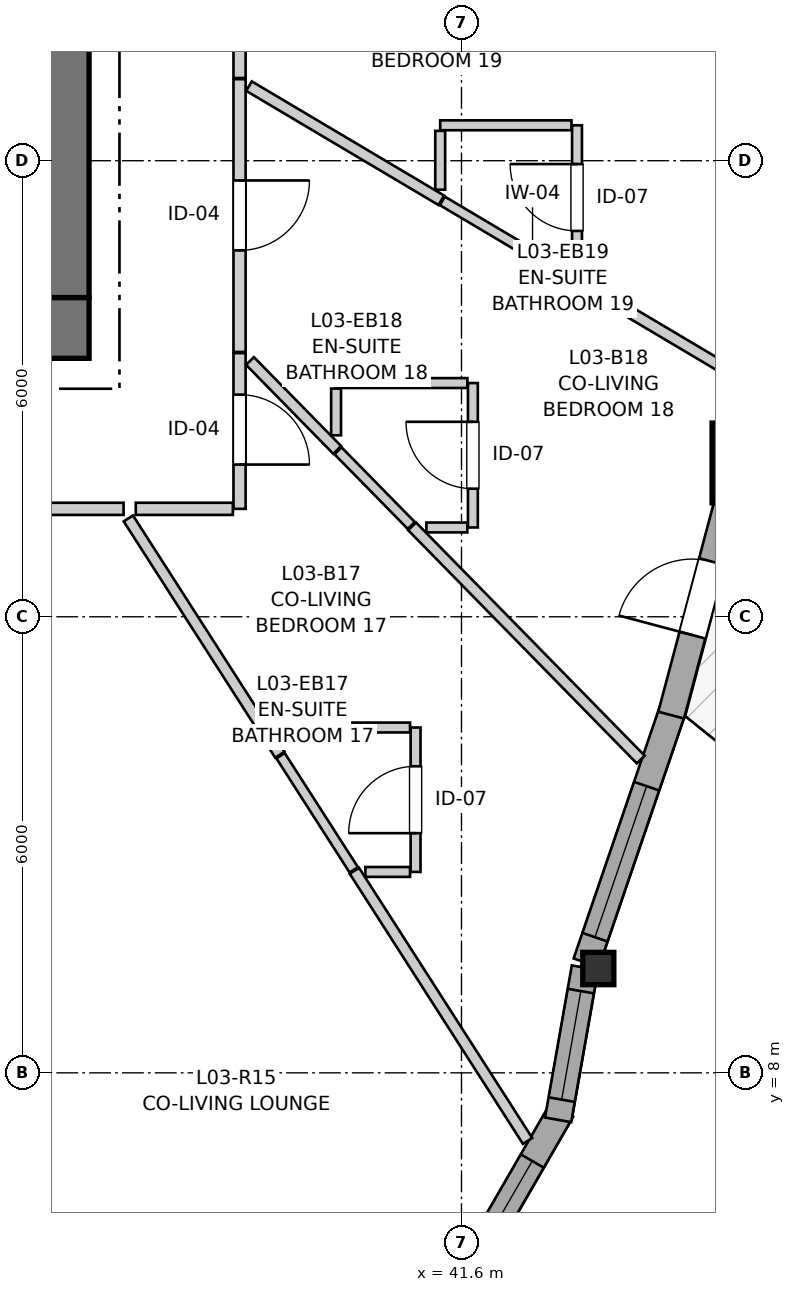
"""IFC4 building model, lengths in metres.
Left out: names, types, materials, properties, quantities, classifications, styles, units other than length and angle.
Written with IfcOpenShell. Run it as: python <this file> out.ifc"""

import sys

from ifc_helpers import new_model, si_unit, direction, frame, frame_2d, origin, origin_2d, place, context, subcontext, project, spatial, rectangle, i_section, extrude, source, transform, mapped, element, fill, save


model = new_model("IFC4")
c1 = context("Model", 3, precision=1e-05, world=origin(), true_north=direction((0.0, 1.0)))
c2 = subcontext(c1, "Body", "Model", "MODEL_VIEW")
j1 = project(units=[si_unit("LENGTHUNIT", "METRE"), si_unit("PLANEANGLEUNIT", "RADIAN")], contexts=[c1])
p1 = place(None, origin())
s1 = spatial("IfcSite", under=j1, at=p1, CompositionType="ELEMENT")
p2 = place(p1, origin())
s2 = spatial("IfcBuilding", under=s1, at=p2, CompositionType="ELEMENT")
p3 = place(p2, frame((0.0, 0.0, 14.2)))
s3 = spatial("IfcBuildingStorey", under=s2, at=p3, CompositionType="ELEMENT", Elevation=14.2)
p4 = place(p3, frame((24.0, 17.8, 0.0), z_axis=(0.0, 0.0, 1.0), x_axis=(1.0, 0.0, 0.0)))
e1 = element("IfcWall", 1, at=p4, inside=s3, PredefinedType="SHEAR", context=c2, shape_type="SweptSolid", body=[
    extrude(rectangle(XDim=12.7, YDim=0.8, at=frame_2d((6.35, 0.0))), origin(), (0.0, 0.0, 1.0), 2.94),
])
p5 = place(p3, frame((36.3, 18.2, 0.0), z_axis=(0.0, 0.0, 1.0), x_axis=(0.0, 1.0, 0.0)))
e2 = element("IfcWall", 2, at=p5, inside=s3, PredefinedType="SHEAR", context=c2, shape_type="SweptSolid", body=[
    extrude(rectangle(XDim=15.6, YDim=0.8, at=frame_2d((7.8, 0.0))), origin(), (0.0, 0.0, 1.0), 2.94),
])
p6 = place(p5, frame((4.25, 0.0, 0.0)))
e3 = element("IfcOpeningElement", 3, at=p6, cuts=e2, PredefinedType="OPENING", context=c2, shape_type="SweptSolid", body=[
    extrude(rectangle(XDim=1.1, YDim=2.15, at=frame_2d((0.55, 1.075))), frame((0.0, 0.41, 0.0), z_axis=(0.0, -1.0, 0.0), x_axis=(1.0, 0.0, 0.0)), (0.0, 0.0, 1.0), 0.82),
])
p7 = place(p5, frame((10.25, 0.0, 0.0)))
e4 = element("IfcOpeningElement", 4, at=p7, cuts=e2, PredefinedType="OPENING", context=c2, shape_type="SweptSolid", body=[
    extrude(rectangle(XDim=1.1, YDim=2.15, at=frame_2d((0.55, 1.075))), frame((0.0, 0.41, 0.0), z_axis=(0.0, -1.0, 0.0), x_axis=(1.0, 0.0, 0.0)), (0.0, 0.0, 1.0), 0.82),
])
m1 = source(origin(), c2, "Body", "SweptSolid", [
    extrude(i_section(OverallWidth=0.409, OverallDepth=0.425, WebThickness=0.03, FlangeThickness=0.048, FilletRadius=0.015, at=origin_2d()), origin(), (0.0, 0.0, 1.0), 2.94),
])
p8 = place(p3, frame((43.4, 9.372, 0.0), z_axis=(0.0, 0.0, 1.0), x_axis=(1.0, 0.0, 0.0)))
e5 = element("IfcColumn", 5, at=p8, inside=s3, PredefinedType="PILASTER", context=c2, shape_type="MappedRepresentation", body=[
    mapped(m1, transform((0.0, 0.0, 0.0), x_axis=(1.0, 0.0, 0.0), y_axis=(0.0, 1.0, 0.0), z_axis=(0.0, 0.0, 1.0), scale=1.0)),
])
m2 = source(origin(), c2, "Body", "SweptSolid", [
    extrude(rectangle(XDim=1.05, YDim=1.05, at=origin_2d()), origin(), (0.0, 0.0, 1.0), 2.94),
])
p9 = place(p3, frame((45.422, 16.023, 0.0), z_axis=(0.0, 0.0, 1.0), x_axis=(1.0, 0.0, 0.0)))
e6 = element("IfcColumn", 6, at=p9, inside=s3, PredefinedType="COLUMN", context=c2, shape_type="MappedRepresentation", body=[
    mapped(m2, transform((0.0, 0.0, 0.0), x_axis=(1.0, 0.0, 0.0), y_axis=(0.0, 1.0, 0.0), z_axis=(0.0, 0.0, 1.0), scale=1.0)),
])
p10 = place(p3, frame((41.873, 5.699, 0.0), z_axis=(0.0, 0.0, 1.0), x_axis=(0.49990781971, 0.866078617559, 0.0)))
e7 = element("IfcWall", 7, at=p10, inside=s3, PredefinedType="SOLIDWALL", context=c2, shape_type="SweptSolid", body=[
    extrude(rectangle(XDim=2.09, YDim=0.35, at=frame_2d((1.045, 0.0))), origin(), (0.0, 0.0, 1.0), 2.42),
])
p11 = place(p10, frame((0.268, 0.0, 0.82)))
e8 = element("IfcOpeningElement", 8, at=p11, cuts=e7, PredefinedType="OPENING", context=c2, shape_type="SweptSolid", body=[
    extrude(rectangle(XDim=1.05, YDim=1.45, at=frame_2d((0.525, 0.725))), frame((0.0, 0.185, 0.0), z_axis=(0.0, -1.0, 0.0), x_axis=(1.0, 0.0, 0.0)), (0.0, 0.0, 1.0), 0.37),
])
p12 = place(p3, frame((42.871, 7.382, 0.0), z_axis=(0.0, 0.0, 1.0), x_axis=(0.173586593252, 0.984818610021, 0.0)))
e9 = element("IfcWall", 9, at=p12, inside=s3, PredefinedType="SOLIDWALL", context=c2, shape_type="SweptSolid", body=[
    extrude(rectangle(XDim=2.032, YDim=0.35, at=frame_2d((1.016, 0.0))), origin(), (0.0, 0.0, 1.0), 2.42),
])
p13 = place(p12, frame((0.27, 0.0, 0.82)))
e10 = element("IfcOpeningElement", 10, at=p13, cuts=e9, PredefinedType="OPENING", context=c2, shape_type="SweptSolid", body=[
    extrude(rectangle(XDim=1.45, YDim=1.25, at=frame_2d((0.725, 0.625))), frame((0.0, 0.185, 0.0), z_axis=(0.0, -1.0, 0.0), x_axis=(1.0, 0.0, 0.0)), (0.0, 0.0, 1.0), 0.37),
])
p14 = place(p3, frame((43.241, 9.448, 0.0), z_axis=(0.0, 0.0, 1.0), x_axis=(0.323599751171, 0.946194060984, 0.0)))
e11 = element("IfcWall", 11, at=p14, inside=s3, PredefinedType="SOLIDWALL", context=c2, shape_type="SweptSolid", body=[
    extrude(rectangle(XDim=3.532, YDim=0.35, at=frame_2d((1.766, 0.0))), origin(), (0.0, 0.0, 1.0), 2.42),
])
p15 = place(p14, frame((0.356, 0.0, 0.82)))
e12 = element("IfcOpeningElement", 12, at=p15, cuts=e11, PredefinedType="OPENING", context=c2, shape_type="SweptSolid", body=[
    extrude(rectangle(XDim=2.1, YDim=1.4, at=frame_2d((1.05, 0.7))), frame((0.0, 0.185, 0.0), z_axis=(0.0, -1.0, 0.0), x_axis=(1.0, 0.0, 0.0)), (0.0, 0.0, 1.0), 0.37),
])
p16 = place(p3, frame((44.358, 12.706, 0.0), z_axis=(0.0, 0.0, 1.0), x_axis=(0.25708907847, 0.966387709841, 0.0)))
e13 = element("IfcWall", 13, at=p16, inside=s3, PredefinedType="SOLIDWALL", context=c2, shape_type="SweptSolid", body=[
    extrude(rectangle(XDim=3.179, YDim=0.35, at=frame_2d((1.59, 0.0))), origin(), (0.0, 0.0, 1.0), 2.42),
])
p17 = place(p16, frame((1.09, 0.0, 0.0)))
e14 = element("IfcOpeningElement", 14, at=p17, cuts=e13, PredefinedType="OPENING", context=c2, shape_type="SweptSolid", body=[
    extrude(rectangle(XDim=1.0, YDim=2.1, at=frame_2d((0.5, 1.05))), frame((0.0, 0.185, 0.0), z_axis=(0.0, -1.0, 0.0), x_axis=(1.0, 0.0, 0.0)), (0.0, 0.0, 1.0), 0.37),
])
p18 = place(p3, frame((37.154, 15.42, 0.0), z_axis=(0.0, 0.0, 1.0), x_axis=(-1.0, 0.0, 0.0)))
e15 = element("IfcWall", 15, at=p18, inside=s3, PredefinedType="PARTITIONING", context=c2, shape_type="SweptSolid", body=[
    extrude(rectangle(XDim=3.774, YDim=0.16, at=frame_2d((1.887, 0.0))), origin(), (0.0, 0.0, 1.0), 2.94),
])
p19 = place(p18, frame((1.239, 0.0, 0.0)))
e16 = element("IfcOpeningElement", 16, at=p19, cuts=e15, PredefinedType="OPENING", context=c2, shape_type="SweptSolid", body=[
    extrude(rectangle(XDim=1.3, YDim=2.1, at=frame_2d((0.65, 1.05))), frame((0.0, 0.09, 0.0), z_axis=(0.0, -1.0, 0.0), x_axis=(1.0, 0.0, 0.0)), (0.0, 0.0, 1.0), 0.18),
])
p20 = place(p3, frame((38.68, 21.073, 0.0), z_axis=(0.0, 0.0, 1.0), x_axis=(0.0, -1.0, 0.0)))
e17 = element("IfcWall", 17, at=p20, inside=s3, PredefinedType="PARTITIONING", context=c2, shape_type="SweptSolid", body=[
    extrude(rectangle(XDim=3.589, YDim=0.16, at=frame_2d((1.794, 0.0))), origin(), (0.0, 0.0, 1.0), 2.94),
])
p21 = place(p20, frame((1.333, 0.0, 0.0)))
e18 = element("IfcOpeningElement", 18, at=p21, cuts=e17, PredefinedType="OPENING", context=c2, shape_type="SweptSolid", body=[
    extrude(rectangle(XDim=0.92, YDim=2.1, at=frame_2d((0.46, 1.05))), frame((0.0, 0.09, 0.0), z_axis=(0.0, -1.0, 0.0), x_axis=(1.0, 0.0, 0.0)), (0.0, 0.0, 1.0), 0.18),
])
p22 = place(p3, frame((38.68, 23.63, 0.0), z_axis=(0.0, 0.0, 1.0), x_axis=(0.0, -1.0, 0.0)))
e19 = element("IfcWall", 19, at=p22, inside=s3, PredefinedType="PARTITIONING", context=c2, shape_type="SweptSolid", body=[
    extrude(rectangle(XDim=2.542, YDim=0.16, at=frame_2d((1.271, 0.0))), origin(), (0.0, 0.0, 1.0), 2.94),
])
p23 = place(p22, frame((0.835, 0.0, 0.0)))
e20 = element("IfcOpeningElement", 20, at=p23, cuts=e19, PredefinedType="OPENING", context=c2, shape_type="SweptSolid", body=[
    extrude(rectangle(XDim=0.92, YDim=2.1, at=frame_2d((0.46, 1.05))), frame((0.0, 0.09, 0.0), z_axis=(0.0, -1.0, 0.0), x_axis=(1.0, 0.0, 0.0)), (0.0, 0.0, 1.0), 0.18),
])
p24 = place(p3, frame((38.68, 17.469, 0.0), z_axis=(0.0, 0.0, 1.0), x_axis=(0.0, -1.0, 0.0)))
e21 = element("IfcWall", 21, at=p24, inside=s3, PredefinedType="PARTITIONING", context=c2, shape_type="SweptSolid", body=[
    extrude(rectangle(XDim=2.049, YDim=0.16, at=frame_2d((1.024, 0.0))), origin(), (0.0, 0.0, 1.0), 2.94),
])
p25 = place(p24, frame((0.546, 0.0, 0.0)))
e22 = element("IfcOpeningElement", 22, at=p25, cuts=e21, PredefinedType="OPENING", context=c2, shape_type="SweptSolid", body=[
    extrude(rectangle(XDim=0.92, YDim=2.1, at=frame_2d((0.46, 1.05))), frame((0.0, 0.09, 0.0), z_axis=(0.0, -1.0, 0.0), x_axis=(1.0, 0.0, 0.0)), (0.0, 0.0, 1.0), 0.18),
])
p26 = place(p3, frame((43.12, 18.566, 0.0), z_axis=(0.0, 0.0, 1.0), x_axis=(0.0, 1.0, 0.0)))
e23 = element("IfcWall", 23, at=p26, inside=s3, PredefinedType="PARTITIONING", context=c2, shape_type="SweptSolid", body=[
    extrude(rectangle(XDim=1.9, YDim=0.13, at=frame_2d((0.95, 0.0))), origin(), (0.0, 0.0, 1.0), 2.94),
])
p27 = place(p26, frame((0.51, 0.0, 0.0)))
e24 = element("IfcOpeningElement", 24, at=p27, cuts=e23, PredefinedType="OPENING", context=c2, shape_type="SweptSolid", body=[
    extrude(rectangle(XDim=0.88, YDim=2.05, at=frame_2d((0.44, 1.025))), frame((0.0, 0.075, 0.0), z_axis=(0.0, -1.0, 0.0), x_axis=(1.0, 0.0, 0.0)), (0.0, 0.0, 1.0), 0.15),
])
p28 = place(p3, frame((40.996, 10.643, 0.0), z_axis=(0.0, 0.0, 1.0), x_axis=(0.0, 1.0, 0.0)))
e25 = element("IfcWall", 25, at=p28, inside=s3, PredefinedType="PARTITIONING", context=c2, shape_type="SweptSolid", body=[
    extrude(rectangle(XDim=1.9, YDim=0.13, at=frame_2d((0.95, 0.0))), origin(), (0.0, 0.0, 1.0), 2.94),
])
p29 = place(p28, frame((0.51, 0.0, 0.0)))
e26 = element("IfcOpeningElement", 26, at=p29, cuts=e25, PredefinedType="OPENING", context=c2, shape_type="SweptSolid", body=[
    extrude(rectangle(XDim=0.88, YDim=2.05, at=frame_2d((0.44, 1.025))), frame((0.0, 0.075, 0.0), z_axis=(0.0, -1.0, 0.0), x_axis=(1.0, 0.0, 0.0)), (0.0, 0.0, 1.0), 0.15),
])
p30 = place(p3, frame((41.75, 15.175, 0.0), z_axis=(0.0, 0.0, 1.0), x_axis=(0.0, 1.0, 0.0)))
e27 = element("IfcWall", 27, at=p30, inside=s3, PredefinedType="PARTITIONING", context=c2, shape_type="SweptSolid", body=[
    extrude(rectangle(XDim=1.9, YDim=0.13, at=frame_2d((0.95, 0.0))), origin(), (0.0, 0.0, 1.0), 2.94),
])
p31 = place(p30, frame((0.51, 0.0, 0.0)))
e28 = element("IfcOpeningElement", 28, at=p31, cuts=e27, PredefinedType="OPENING", context=c2, shape_type="SweptSolid", body=[
    extrude(rectangle(XDim=0.88, YDim=2.05, at=frame_2d((0.44, 1.025))), frame((0.0, 0.075, 0.0), z_axis=(0.0, -1.0, 0.0), x_axis=(1.0, 0.0, 0.0)), (0.0, 0.0, 1.0), 0.15),
])
p32 = place(p3, frame((33.426, 15.312, 0.0), z_axis=(0.0, 0.0, 1.0), x_axis=(0.276606114731, -0.960983380342, 0.0)))
e29 = element("IfcWall", 29, at=p32, inside=s3, PredefinedType="PARTITIONING", context=c2, shape_type="SweptSolid", body=[
    extrude(rectangle(XDim=11.749, YDim=0.145, at=frame_2d((5.875, 0.0))), origin(), (0.0, 0.0, 1.0), 2.94),
])
p33 = place(p3, frame((40.95, 15.19, 0.0), z_axis=(0.0, 0.0, 1.0), x_axis=(0.700142401903, -0.714003233226, 0.0)))
e30 = element("IfcWall", 30, at=p33, inside=s3, PredefinedType="PARTITIONING", context=c2, shape_type="SweptSolid", body=[
    extrude(rectangle(XDim=4.298, YDim=0.145, at=frame_2d((2.149, 0.0))), origin(), (0.0, 0.0, 1.0), 2.94),
])
p34 = place(p3, frame((40.191, 10.658, 0.0), z_axis=(0.0, 0.0, 1.0), x_axis=(0.539757550566, -0.841820519236, 0.0)))
e31 = element("IfcWall", 31, at=p34, inside=s3, PredefinedType="PARTITIONING", context=c2, shape_type="SweptSolid", body=[
    extrude(rectangle(XDim=4.221, YDim=0.145, at=frame_2d((2.111, 0.0))), origin(), (0.0, 0.0, 1.0), 2.94),
])
p35 = place(p3, frame((37.217, 15.294, 0.0), z_axis=(0.0, 0.0, 1.0), x_axis=(0.539878709929, -0.841742822105, 0.0)))
e32 = element("IfcWall", 32, at=p35, inside=s3, PredefinedType="PARTITIONING", context=c2, shape_type="SweptSolid", body=[
    extrude(rectangle(XDim=3.694, YDim=0.145, at=frame_2d((1.847, 0.0))), origin(), (0.0, 0.0, 1.0), 2.94),
])
p36 = place(p3, frame((38.804, 20.981, 0.0), z_axis=(0.0, 0.0, 1.0), x_axis=(0.859905944731, -0.510452511225, 0.0)))
e33 = element("IfcWall", 33, at=p36, inside=s3, PredefinedType="PARTITIONING", context=c2, shape_type="SweptSolid", body=[
    extrude(rectangle(XDim=2.943, YDim=0.145, at=frame_2d((1.472, 0.0))), origin(), (0.0, 0.0, 1.0), 2.94),
])
p37 = place(p3, frame((42.848, 18.581, 0.0), z_axis=(0.0, 0.0, 1.0), x_axis=(0.859872599939, -0.510508679528, 0.0)))
e34 = element("IfcWall", 34, at=p37, inside=s3, PredefinedType="PARTITIONING", context=c2, shape_type="SweptSolid", body=[
    extrude(rectangle(XDim=2.813, YDim=0.145, at=frame_2d((1.407, 0.0))), origin(), (0.0, 0.0, 1.0), 2.94),
])
p38 = place(p3, frame((38.817, 17.365, 0.0), z_axis=(0.0, 0.0, 1.0), x_axis=(0.70029627305, -0.713852316626, 0.0)))
e35 = element("IfcWall", 35, at=p38, inside=s3, PredefinedType="PARTITIONING", context=c2, shape_type="SweptSolid", body=[
    extrude(rectangle(XDim=1.639, YDim=0.145, at=frame_2d((0.819, 0.0))), origin(), (0.0, 0.0, 1.0), 2.94),
])
for number, where, z_axis, x_axis in (
    (36, (39.196, 12.543, 0.0), (0.0, 0.0, 1.0), (1.0, 0.0, 0.0)),
    (37, (39.95, 17.075, 0.0), (0.0, 0.0, 1.0), (1.0, 0.0, 0.0)),
    (38, (41.32, 20.466, 0.0), (0.0, 0.0, 1.0), (1.0, 0.0, 0.0)),
):
    element("IfcWall", number, at=place(p3, frame(where, z_axis=z_axis, x_axis=x_axis)), inside=s3, PredefinedType="PARTITIONING", context=c2, shape_type="SweptSolid", body=[
        extrude(rectangle(XDim=1.727, YDim=0.13, at=frame_2d((0.864, 0.0))), origin(), (0.0, 0.0, 1.0), 2.94),
    ])
p39 = place(p3, frame((39.219, 12.172, 0.0), z_axis=(0.0, 0.0, 1.0), x_axis=(0.539899826285, -0.84172927808, 0.0)))
e39 = element("IfcWall", 39, at=p39, inside=s3, PredefinedType="PARTITIONING", context=c2, shape_type="SweptSolid", body=[
    extrude(rectangle(XDim=1.784, YDim=0.13, at=frame_2d((0.892, 0.0))), origin(), (0.0, 0.0, 1.0), 2.94),
])
p40 = place(p3, frame((41.348, 19.471, 0.0), z_axis=(0.0, 0.0, 1.0), x_axis=(0.859825694404, -0.510587676352, 0.0)))
e40 = element("IfcWall", 40, at=p40, inside=s3, PredefinedType="PARTITIONING", context=c2, shape_type="SweptSolid", body=[
    extrude(rectangle(XDim=1.729, YDim=0.13, at=frame_2d((0.865, 0.0))), origin(), (0.0, 0.0, 1.0), 2.94),
])
p41 = place(p3, frame((37.314, 15.42, 0.0), z_axis=(0.0, 0.0, 1.0), x_axis=(1.0, 0.0, 0.0)))
e41 = element("IfcWall", 41, at=p41, inside=s3, PredefinedType="PARTITIONING", context=c2, shape_type="SweptSolid", body=[
    extrude(rectangle(XDim=1.278, YDim=0.16, at=frame_2d((0.639, 0.0))), origin(), (0.0, 0.0, 1.0), 2.94),
])
p42 = place(p3, frame((39.975, 16.184, 0.0), z_axis=(0.0, 0.0, 1.0), x_axis=(0.700338966049, -0.713810431861, 0.0)))
e42 = element("IfcWall", 42, at=p42, inside=s3, PredefinedType="PARTITIONING", context=c2, shape_type="SweptSolid", body=[
    extrude(rectangle(XDim=1.377, YDim=0.13, at=frame_2d((0.689, 0.0))), origin(), (0.0, 0.0, 1.0), 2.94),
])
p43 = place(p3, frame((41.32, 19.619, 0.0), z_axis=(0.0, 0.0, 1.0), x_axis=(0.0, 1.0, 0.0)))
e43 = element("IfcWall", 43, at=p43, inside=s3, PredefinedType="PARTITIONING", context=c2, shape_type="SweptSolid", body=[
    extrude(rectangle(XDim=0.774, YDim=0.13, at=frame_2d((0.387, 0.0))), origin(), (0.0, 0.0, 1.0), 2.94),
])
p44 = place(p3, frame((39.95, 16.388, 0.0), z_axis=(0.0, 0.0, 1.0), x_axis=(0.0, 1.0, 0.0)))
e44 = element("IfcWall", 44, at=p44, inside=s3, PredefinedType="PARTITIONING", context=c2, shape_type="SweptSolid", body=[
    extrude(rectangle(XDim=0.614, YDim=0.13, at=frame_2d((0.307, 0.0))), origin(), (0.0, 0.0, 1.0), 2.94),
])
p45 = place(p3, frame((40.336, 10.643, 0.0), z_axis=(0.0, 0.0, 1.0), x_axis=(1.0, 0.0, 0.0)))
e45 = element("IfcWall", 45, at=p45, inside=s3, PredefinedType="PARTITIONING", context=c2, shape_type="SweptSolid", body=[
    extrude(rectangle(XDim=0.587, YDim=0.13, at=frame_2d((0.294, 0.0))), origin(), (0.0, 0.0, 1.0), 2.94),
])
p46 = place(p3, frame((41.138, 15.175, 0.0), z_axis=(0.0, 0.0, 1.0), x_axis=(1.0, 0.0, 0.0)))
e46 = element("IfcWall", 46, at=p46, inside=s3, PredefinedType="PARTITIONING", context=c2, shape_type="SweptSolid", body=[
    extrude(rectangle(XDim=0.539, YDim=0.13, at=frame_2d((0.27, 0.0))), origin(), (0.0, 0.0, 1.0), 2.94),
])
m3 = source(origin(), c2, "Body", "SweptSolid", [
    extrude(rectangle(XDim=1.05, YDim=1.45, at=frame_2d((0.525, 0.725))), frame((0.0, 0.03, 0.0), z_axis=(0.0, -1.0, 0.0), x_axis=(1.0, 0.0, 0.0)), (0.0, 0.0, 1.0), 0.06),
])
p47 = place(p11, origin())
e47 = element("IfcWindow", 47, at=p47, inside=s3, PartitioningType="SINGLE_PANEL", PredefinedType="WINDOW", context=c2, shape_type="MappedRepresentation", body=[
    mapped(m3, transform((0.0, 0.0, 0.0), x_axis=(1.0, 0.0, 0.0), y_axis=(0.0, 1.0, 0.0), z_axis=(0.0, 0.0, 1.0), scale=1.0)),
])
fill(e8, e47)
m4 = source(origin(), c2, "Body", "SweptSolid", [
    extrude(rectangle(XDim=1.45, YDim=1.25, at=frame_2d((0.725, 0.625))), frame((0.0, 0.03, 0.0), z_axis=(0.0, -1.0, 0.0), x_axis=(1.0, 0.0, 0.0)), (0.0, 0.0, 1.0), 0.06),
])
p48 = place(p13, origin())
e48 = element("IfcWindow", 48, at=p48, inside=s3, PartitioningType="SINGLE_PANEL", PredefinedType="WINDOW", context=c2, shape_type="MappedRepresentation", body=[
    mapped(m4, transform((0.0, 0.0, 0.0), x_axis=(1.0, 0.0, 0.0), y_axis=(0.0, 1.0, 0.0), z_axis=(0.0, 0.0, 1.0), scale=1.0)),
])
fill(e10, e48)
m5 = source(origin(), c2, "Body", "SweptSolid", [
    extrude(rectangle(XDim=2.1, YDim=1.4, at=frame_2d((1.05, 0.7))), frame((0.0, 0.03, 0.0), z_axis=(0.0, -1.0, 0.0), x_axis=(1.0, 0.0, 0.0)), (0.0, 0.0, 1.0), 0.06),
])
p49 = place(p15, origin())
e49 = element("IfcWindow", 49, at=p49, inside=s3, PartitioningType="SINGLE_PANEL", PredefinedType="WINDOW", context=c2, shape_type="MappedRepresentation", body=[
    mapped(m5, transform((0.0, 0.0, 0.0), x_axis=(1.0, 0.0, 0.0), y_axis=(0.0, 1.0, 0.0), z_axis=(0.0, 0.0, 1.0), scale=1.0)),
])
fill(e12, e49)
m6 = source(origin(), c2, "Body", "SweptSolid", [
    extrude(rectangle(XDim=1.0, YDim=2.1, at=frame_2d((0.5, 1.05))), frame((0.0, 0.025, 0.0), z_axis=(0.0, -1.0, 0.0), x_axis=(1.0, 0.0, 0.0)), (0.0, 0.0, 1.0), 0.05),
])
p50 = place(p17, origin())
e50 = element("IfcDoor", 50, at=p50, inside=s3, OperationType="SINGLE_SWING_LEFT", PredefinedType="DOOR", context=c2, shape_type="MappedRepresentation", body=[
    mapped(m6, transform((0.0, 0.0, 0.0), x_axis=(1.0, 0.0, 0.0), y_axis=(0.0, 1.0, 0.0), z_axis=(0.0, 0.0, 1.0), scale=1.0)),
])
fill(e14, e50)
m7 = source(origin(), c2, "Body", "SweptSolid", [
    extrude(rectangle(XDim=0.92, YDim=2.1, at=frame_2d((0.46, 1.05))), frame((0.0, 0.025, 0.0), z_axis=(0.0, -1.0, 0.0), x_axis=(1.0, 0.0, 0.0)), (0.0, 0.0, 1.0), 0.05),
])
p51 = place(p21, origin())
e51 = element("IfcDoor", 51, at=p51, inside=s3, OperationType="SINGLE_SWING_LEFT", PredefinedType="DOOR", context=c2, shape_type="MappedRepresentation", body=[
    mapped(m7, transform((0.0, 0.0, 0.0), x_axis=(1.0, 0.0, 0.0), y_axis=(0.0, 1.0, 0.0), z_axis=(0.0, 0.0, 1.0), scale=1.0)),
])
fill(e18, e51)
p52 = place(p25, origin())
e52 = element("IfcDoor", 52, at=p52, inside=s3, OperationType="SINGLE_SWING_RIGHT", PredefinedType="DOOR", context=c2, shape_type="MappedRepresentation", body=[
    mapped(m7, transform((0.0, 0.0, 0.0), x_axis=(1.0, 0.0, 0.0), y_axis=(0.0, 1.0, 0.0), z_axis=(0.0, 0.0, 1.0), scale=1.0)),
])
fill(e22, e52)
m8 = source(origin(), c2, "Body", "SweptSolid", [
    extrude(rectangle(XDim=0.88, YDim=2.05, at=frame_2d((0.44, 1.025))), frame((0.0, 0.025, 0.0), z_axis=(0.0, -1.0, 0.0), x_axis=(1.0, 0.0, 0.0)), (0.0, 0.0, 1.0), 0.05),
])
p53 = place(p27, origin())
e53 = element("IfcDoor", 53, at=p53, inside=s3, OperationType="SINGLE_SWING_RIGHT", PredefinedType="DOOR", context=c2, shape_type="MappedRepresentation", body=[
    mapped(m8, transform((0.0, 0.0, 0.0), x_axis=(1.0, 0.0, 0.0), y_axis=(0.0, 1.0, 0.0), z_axis=(0.0, 0.0, 1.0), scale=1.0)),
])
fill(e24, e53)
p54 = place(p29, origin())
e54 = element("IfcDoor", 54, at=p54, inside=s3, OperationType="SINGLE_SWING_LEFT", PredefinedType="DOOR", context=c2, shape_type="MappedRepresentation", body=[
    mapped(m8, transform((0.0, 0.0, 0.0), x_axis=(1.0, 0.0, 0.0), y_axis=(0.0, 1.0, 0.0), z_axis=(0.0, 0.0, 1.0), scale=1.0)),
])
fill(e26, e54)
p55 = place(p31, origin())
e55 = element("IfcDoor", 55, at=p55, inside=s3, OperationType="SINGLE_SWING_RIGHT", PredefinedType="DOOR", context=c2, shape_type="MappedRepresentation", body=[
    mapped(m8, transform((0.0, 0.0, 0.0), x_axis=(1.0, 0.0, 0.0), y_axis=(0.0, 1.0, 0.0), z_axis=(0.0, 0.0, 1.0), scale=1.0)),
])
fill(e28, e55)
save(model, sys.argv[1])
